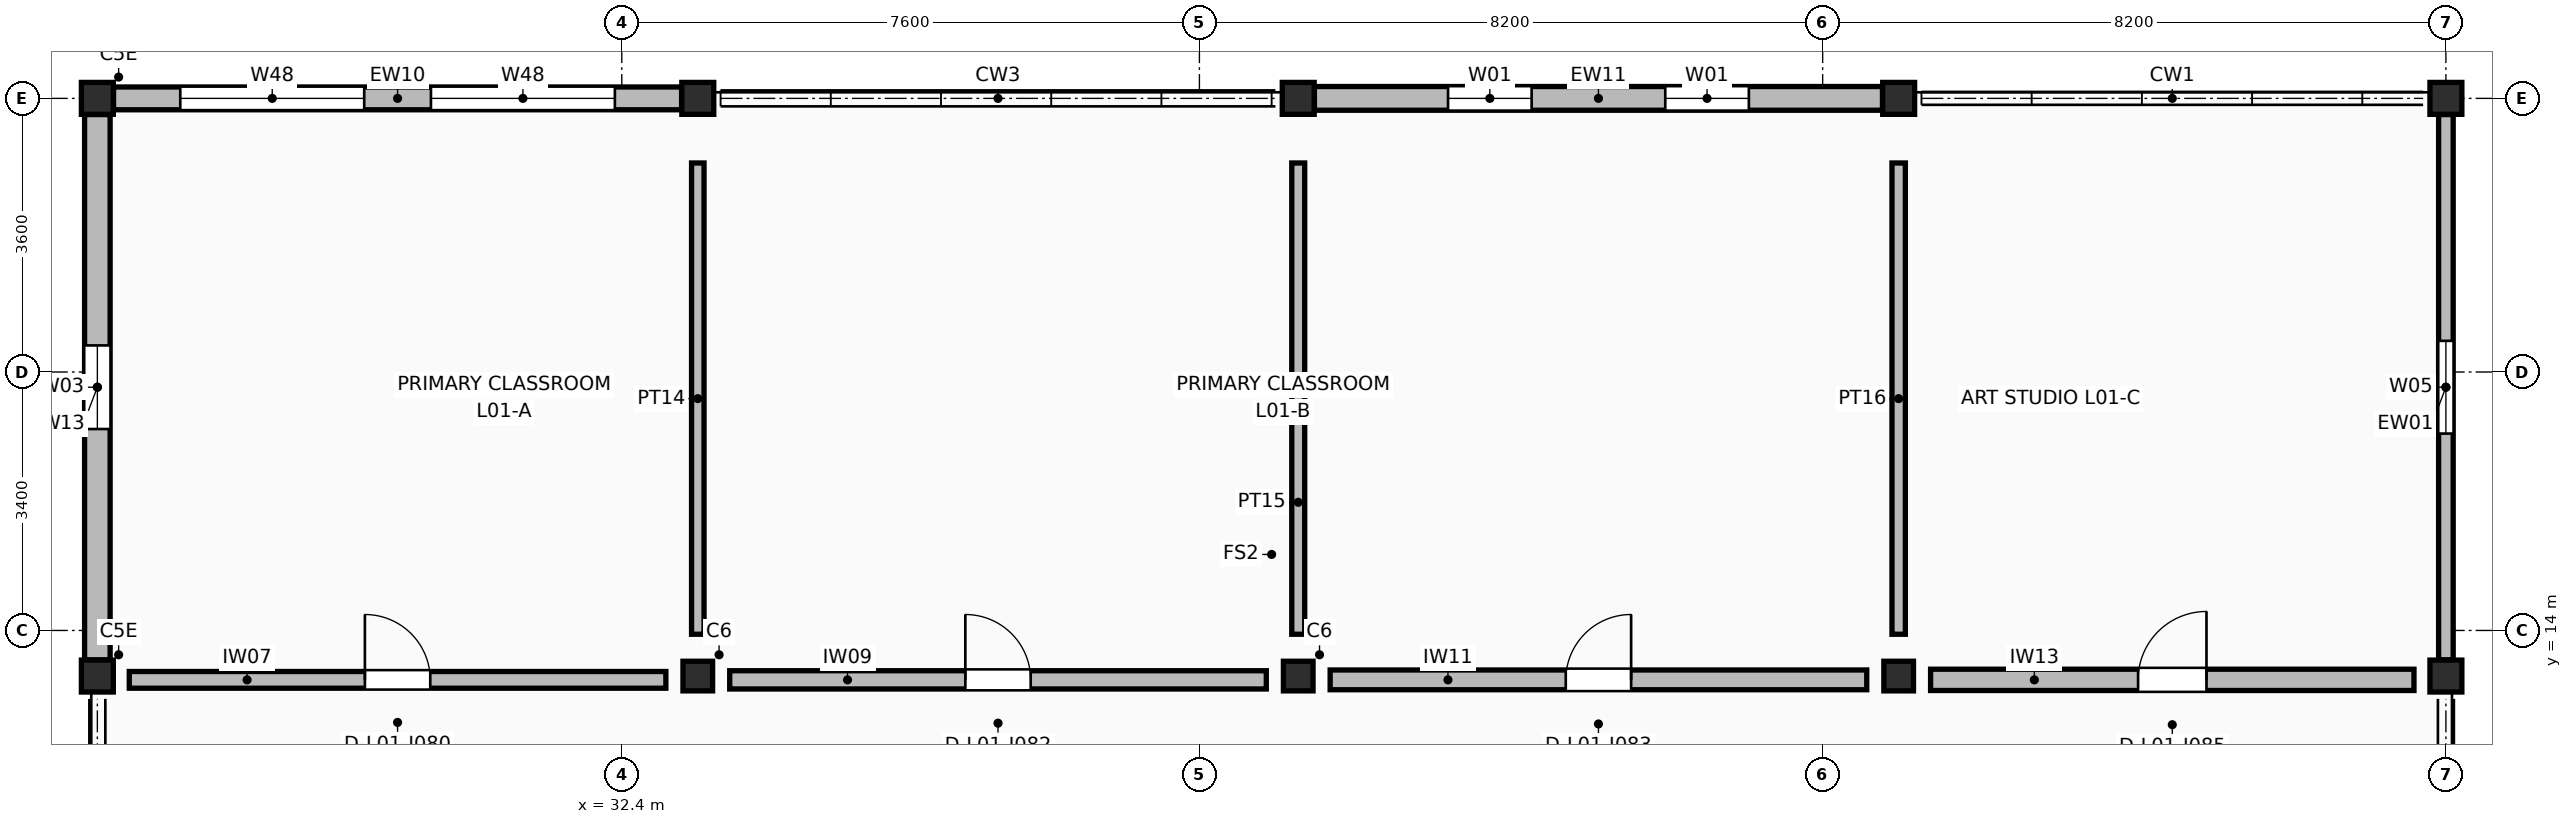
"""IFC4 building model, lengths in metres.
Left out: names, types, materials, properties, quantities, classifications, styles, units other than length and angle.
Written with IfcOpenShell. Run it as: python <this file> out.ifc"""

import sys

from ifc_helpers import new_model, si_unit, direction, frame, frame_2d, origin, origin_2d, place, context, subcontext, project, spatial, rectangle, extrude, element, fill, save


model = new_model("IFC4")
c1 = context("Model", 3, precision=1e-05, world=origin(), true_north=direction((0.0, 1.0)))
c2 = subcontext(c1, "Body", "Model", "MODEL_VIEW")
j1 = project(units=[si_unit("LENGTHUNIT", "METRE"), si_unit("PLANEANGLEUNIT", "RADIAN")], contexts=[c1])
p1 = place(None, origin())
s1 = spatial("IfcSite", under=j1, at=p1, CompositionType="ELEMENT")
p2 = place(p1, origin())
s2 = spatial("IfcBuilding", under=s1, at=p2, CompositionType="ELEMENT")
p3 = place(p2, frame((0.0, 0.0, 4.42)))
s3 = spatial("IfcBuildingStorey", under=s2, at=p3, CompositionType="ELEMENT", Elevation=4.42)
for number, where, z_axis, x_axis in (
    (1, (25.5, 13.4, 0.0), (0.0, 0.0, 1.0), (1.0, 0.0, 0.0)),
    (2, (25.5, 21.0, 0.0), (0.0, 0.0, 1.0), (1.0, 0.0, 0.0)),
):
    element("IfcColumn", number, at=place(p3, frame(where, z_axis=z_axis, x_axis=x_axis)), inside=s3, PredefinedType="COLUMN", context=c2, shape_type="SweptSolid", body=[
        extrude(rectangle(XDim=0.42, YDim=0.42, at=origin_2d()), origin(), (0.0, 0.0, 1.0), 3.74),
    ])
p4 = place(p3, frame((33.4, 13.4, 0.0), z_axis=(0.0, 0.0, 1.0), x_axis=(1.0, 0.0, 0.0)))
e3 = element("IfcColumn", 3, at=p4, inside=s3, PredefinedType="COLUMN", context=c2, shape_type="SweptSolid", body=[
    extrude(rectangle(XDim=0.39, YDim=0.39, at=origin_2d()), origin(), (0.0, 0.0, 1.0), 3.74),
])
p5 = place(p3, frame((33.4, 21.0, 0.0), z_axis=(0.0, 0.0, 1.0), x_axis=(1.0, 0.0, 0.0)))
e4 = element("IfcColumn", 4, at=p5, inside=s3, PredefinedType="COLUMN", context=c2, shape_type="SweptSolid", body=[
    extrude(rectangle(XDim=0.42, YDim=0.42, at=origin_2d()), origin(), (0.0, 0.0, 1.0), 3.74),
])
p6 = place(p3, frame((41.3, 13.4, 0.0), z_axis=(0.0, 0.0, 1.0), x_axis=(1.0, 0.0, 0.0)))
e5 = element("IfcColumn", 5, at=p6, inside=s3, PredefinedType="COLUMN", context=c2, shape_type="SweptSolid", body=[
    extrude(rectangle(XDim=0.39, YDim=0.39, at=origin_2d()), origin(), (0.0, 0.0, 1.0), 3.74),
])
p7 = place(p3, frame((41.3, 21.0, 0.0), z_axis=(0.0, 0.0, 1.0), x_axis=(1.0, 0.0, 0.0)))
e6 = element("IfcColumn", 6, at=p7, inside=s3, PredefinedType="COLUMN", context=c2, shape_type="SweptSolid", body=[
    extrude(rectangle(XDim=0.42, YDim=0.42, at=origin_2d()), origin(), (0.0, 0.0, 1.0), 3.74),
])
p8 = place(p3, frame((49.2, 13.4, 0.0), z_axis=(0.0, 0.0, 1.0), x_axis=(1.0, 0.0, 0.0)))
e7 = element("IfcColumn", 7, at=p8, inside=s3, PredefinedType="COLUMN", context=c2, shape_type="SweptSolid", body=[
    extrude(rectangle(XDim=0.39, YDim=0.39, at=origin_2d()), origin(), (0.0, 0.0, 1.0), 3.74),
])
for number, where, z_axis, x_axis in (
    (8, (49.2, 21.0, 0.0), (0.0, 0.0, 1.0), (1.0, 0.0, 0.0)),
    (9, (56.4, 13.4, 0.0), (0.0, 0.0, 1.0), (1.0, 0.0, 0.0)),
    (10, (56.4, 21.0, 0.0), (0.0, 0.0, 1.0), (1.0, 0.0, 0.0)),
):
    element("IfcColumn", number, at=place(p3, frame(where, z_axis=z_axis, x_axis=x_axis)), inside=s3, PredefinedType="COLUMN", context=c2, shape_type="SweptSolid", body=[
        extrude(rectangle(XDim=0.42, YDim=0.42, at=origin_2d()), origin(), (0.0, 0.0, 1.0), 3.74),
    ])
p9 = place(p3, frame((25.713, 21.0, 0.0), z_axis=(0.0, 0.0, 1.0), x_axis=(1.0, 0.0, 0.0)))
e11 = element("IfcWall", 11, at=p9, inside=s3, PredefinedType="STANDARD", context=c2, shape_type="SweptSolid", body=[
    extrude(rectangle(XDim=7.474, YDim=0.3, at=frame_2d((3.737, 0.0))), origin(), (0.0, 0.0, 1.0), 2.78),
])
p10 = place(p9, frame((0.878, 0.0, 0.95)))
e12 = element("IfcOpeningElement", 12, at=p10, cuts=e11, PredefinedType="OPENING", context=c2, shape_type="SweptSolid", body=[
    extrude(rectangle(XDim=2.42, YDim=1.6, at=frame_2d((1.21, 0.8))), frame((0.0, 0.16, 0.0), z_axis=(0.0, -1.0, 0.0), x_axis=(1.0, 0.0, 0.0)), (0.0, 0.0, 1.0), 0.32),
])
p11 = place(p9, frame((4.176, 0.0, 0.95)))
e13 = element("IfcOpeningElement", 13, at=p11, cuts=e11, PredefinedType="OPENING", context=c2, shape_type="SweptSolid", body=[
    extrude(rectangle(XDim=2.42, YDim=1.6, at=frame_2d((1.21, 0.8))), frame((0.0, 0.16, 0.0), z_axis=(0.0, -1.0, 0.0), x_axis=(1.0, 0.0, 0.0)), (0.0, 0.0, 1.0), 0.32),
])
p12 = place(p3, frame((41.513, 21.0, 0.0), z_axis=(0.0, 0.0, 1.0), x_axis=(1.0, 0.0, 0.0)))
e14 = element("IfcWall", 14, at=p12, inside=s3, PredefinedType="STANDARD", context=c2, shape_type="SweptSolid", body=[
    extrude(rectangle(XDim=7.474, YDim=0.312, at=frame_2d((3.737, 0.0))), origin(), (0.0, 0.0, 1.0), 2.78),
])
p13 = place(p12, frame((1.758, 0.0, 0.95)))
e15 = element("IfcOpeningElement", 15, at=p13, cuts=e14, PredefinedType="OPENING", context=c2, shape_type="SweptSolid", body=[
    extrude(rectangle(XDim=1.1, YDim=1.15, at=frame_2d((0.55, 0.575))), frame((0.0, 0.166, 0.0), z_axis=(0.0, -1.0, 0.0), x_axis=(1.0, 0.0, 0.0)), (0.0, 0.0, 1.0), 0.332),
])
p14 = place(p12, frame((4.616, 0.0, 0.95)))
e16 = element("IfcOpeningElement", 16, at=p14, cuts=e14, PredefinedType="OPENING", context=c2, shape_type="SweptSolid", body=[
    extrude(rectangle(XDim=1.1, YDim=1.15, at=frame_2d((0.55, 0.575))), frame((0.0, 0.166, 0.0), z_axis=(0.0, -1.0, 0.0), x_axis=(1.0, 0.0, 0.0)), (0.0, 0.0, 1.0), 0.332),
])
p15 = place(p3, frame((25.5, 13.613, 0.0), z_axis=(0.0, 0.0, 1.0), x_axis=(0.0, 1.0, 0.0)))
e17 = element("IfcWall", 17, at=p15, inside=s3, PredefinedType="STANDARD", context=c2, shape_type="SweptSolid", body=[
    extrude(rectangle(XDim=7.174, YDim=0.336, at=frame_2d((3.587, 0.0))), origin(), (0.0, 0.0, 1.0), 2.78),
])
p16 = place(p15, frame((3.037, 0.0, 0.95)))
e18 = element("IfcOpeningElement", 18, at=p16, cuts=e17, PredefinedType="OPENING", context=c2, shape_type="SweptSolid", body=[
    extrude(rectangle(XDim=1.1, YDim=1.45, at=frame_2d((0.55, 0.725))), frame((0.0, 0.178, 0.0), z_axis=(0.0, -1.0, 0.0), x_axis=(1.0, 0.0, 0.0)), (0.0, 0.0, 1.0), 0.356),
])
p17 = place(p3, frame((56.4, 13.613, 0.0), z_axis=(0.0, 0.0, 1.0), x_axis=(0.0, 1.0, 0.0)))
e19 = element("IfcWall", 19, at=p17, inside=s3, PredefinedType="STANDARD", context=c2, shape_type="SweptSolid", body=[
    extrude(rectangle(XDim=7.174, YDim=0.192, at=frame_2d((3.587, 0.0))), origin(), (0.0, 0.0, 1.0), 2.78),
])
p18 = place(p17, frame((2.977, 0.0, 0.95)))
e20 = element("IfcOpeningElement", 20, at=p18, cuts=e19, PredefinedType="OPENING", context=c2, shape_type="SweptSolid", body=[
    extrude(rectangle(XDim=1.22, YDim=1.15, at=frame_2d((0.61, 0.575))), frame((0.0, 0.106, 0.0), z_axis=(0.0, -1.0, 0.0), x_axis=(1.0, 0.0, 0.0)), (0.0, 0.0, 1.0), 0.212),
])
p19 = place(p3, frame((25.92, 13.35, 0.0), z_axis=(0.0, 0.0, 1.0), x_axis=(1.0, 0.0, 0.0)))
e21 = element("IfcWall", 21, at=p19, inside=s3, PredefinedType="STANDARD", context=c2, shape_type="SweptSolid", body=[
    extrude(rectangle(XDim=7.06, YDim=0.22, at=frame_2d((3.53, 0.0))), origin(), (0.0, 0.0, 1.0), 2.75),
])
p20 = place(p19, frame((3.1, 0.0, 0.0)))
e22 = element("IfcOpeningElement", 22, at=p20, cuts=e21, PredefinedType="OPENING", context=c2, shape_type="SweptSolid", body=[
    extrude(rectangle(XDim=0.86, YDim=2.06, at=frame_2d((0.43, 1.03))), frame((0.0, 0.12, 0.0), z_axis=(0.0, -1.0, 0.0), x_axis=(1.0, 0.0, 0.0)), (0.0, 0.0, 1.0), 0.24),
])
p21 = place(p3, frame((33.82, 13.35, 0.0), z_axis=(0.0, 0.0, 1.0), x_axis=(1.0, 0.0, 0.0)))
e23 = element("IfcWall", 23, at=p21, inside=s3, PredefinedType="STANDARD", context=c2, shape_type="SweptSolid", body=[
    extrude(rectangle(XDim=7.06, YDim=0.24, at=frame_2d((3.53, 0.0))), origin(), (0.0, 0.0, 1.0), 2.75),
])
p22 = place(p21, frame((3.1, 0.0, 0.0)))
e24 = element("IfcOpeningElement", 24, at=p22, cuts=e23, PredefinedType="OPENING", context=c2, shape_type="SweptSolid", body=[
    extrude(rectangle(XDim=0.86, YDim=2.18, at=frame_2d((0.43, 1.09))), frame((0.0, 0.13, 0.0), z_axis=(0.0, -1.0, 0.0), x_axis=(1.0, 0.0, 0.0)), (0.0, 0.0, 1.0), 0.26),
])
p23 = place(p3, frame((41.72, 13.35, 0.0), z_axis=(0.0, 0.0, 1.0), x_axis=(1.0, 0.0, 0.0)))
e25 = element("IfcWall", 25, at=p23, inside=s3, PredefinedType="STANDARD", context=c2, shape_type="SweptSolid", body=[
    extrude(rectangle(XDim=7.06, YDim=0.26, at=frame_2d((3.53, 0.0))), origin(), (0.0, 0.0, 1.0), 2.75),
])
p24 = place(p23, frame((3.1, 0.0, 0.0)))
e26 = element("IfcOpeningElement", 26, at=p24, cuts=e25, PredefinedType="OPENING", context=c2, shape_type="SweptSolid", body=[
    extrude(rectangle(XDim=0.86, YDim=2.24, at=frame_2d((0.43, 1.12))), frame((0.0, 0.14, 0.0), z_axis=(0.0, -1.0, 0.0), x_axis=(1.0, 0.0, 0.0)), (0.0, 0.0, 1.0), 0.28),
])
p25 = place(p3, frame((49.62, 13.35, 0.0), z_axis=(0.0, 0.0, 1.0), x_axis=(1.0, 0.0, 0.0)))
e27 = element("IfcWall", 27, at=p25, inside=s3, PredefinedType="STANDARD", context=c2, shape_type="SweptSolid", body=[
    extrude(rectangle(XDim=6.36, YDim=0.28, at=frame_2d((3.18, 0.0))), origin(), (0.0, 0.0, 1.0), 2.75),
])
p26 = place(p25, frame((2.73, 0.0, 0.0)))
e28 = element("IfcOpeningElement", 28, at=p26, cuts=e27, PredefinedType="OPENING", context=c2, shape_type="SweptSolid", body=[
    extrude(rectangle(XDim=0.9, YDim=2.12, at=frame_2d((0.45, 1.06))), frame((0.0, 0.15, 0.0), z_axis=(0.0, -1.0, 0.0), x_axis=(1.0, 0.0, 0.0)), (0.0, 0.0, 1.0), 0.3),
])
p27 = place(p3, frame((33.4, 13.95, 0.0), z_axis=(0.0, 0.0, 1.0), x_axis=(0.0, 1.0, 0.0)))
e29 = element("IfcWall", 29, at=p27, inside=s3, PredefinedType="PARTITIONING", context=c2, shape_type="SweptSolid", body=[
    extrude(rectangle(XDim=6.2, YDim=0.164, at=frame_2d((3.1, 0.0))), origin(), (0.0, 0.0, 1.0), 2.75),
])
p28 = place(p3, frame((41.3, 13.95, 0.0), z_axis=(0.0, 0.0, 1.0), x_axis=(0.0, 1.0, 0.0)))
e30 = element("IfcWall", 30, at=p28, inside=s3, PredefinedType="PARTITIONING", context=c2, shape_type="SweptSolid", body=[
    extrude(rectangle(XDim=6.2, YDim=0.17, at=frame_2d((3.1, 0.0))), origin(), (0.0, 0.0, 1.0), 2.75),
])
p29 = place(p3, frame((49.2, 13.95, 0.0), z_axis=(0.0, 0.0, 1.0), x_axis=(0.0, 1.0, 0.0)))
e31 = element("IfcWall", 31, at=p29, inside=s3, PredefinedType="PARTITIONING", context=c2, shape_type="SweptSolid", body=[
    extrude(rectangle(XDim=6.2, YDim=0.176, at=frame_2d((3.1, 0.0))), origin(), (0.0, 0.0, 1.0), 2.75),
])
p30 = place(p10, origin())
e32 = element("IfcWindow", 32, at=p30, inside=s3, PartitioningType="SINGLE_PANEL", PredefinedType="WINDOW", context=c2, shape_type="SweptSolid", body=[
    extrude(rectangle(XDim=2.42, YDim=1.6, at=frame_2d((1.21, 0.8))), frame((0.0, 0.03, 0.0), z_axis=(0.0, -1.0, 0.0), x_axis=(1.0, 0.0, 0.0)), (0.0, 0.0, 1.0), 0.06),
])
fill(e12, e32)
p31 = place(p11, origin())
e33 = element("IfcWindow", 33, at=p31, inside=s3, PartitioningType="SINGLE_PANEL", PredefinedType="WINDOW", context=c2, shape_type="SweptSolid", body=[
    extrude(rectangle(XDim=2.42, YDim=1.6, at=frame_2d((1.21, 0.8))), frame((0.0, 0.03, 0.0), z_axis=(0.0, -1.0, 0.0), x_axis=(1.0, 0.0, 0.0)), (0.0, 0.0, 1.0), 0.06),
])
fill(e13, e33)
p32 = place(p13, origin())
e34 = element("IfcWindow", 34, at=p32, inside=s3, PartitioningType="SINGLE_PANEL", PredefinedType="WINDOW", context=c2, shape_type="SweptSolid", body=[
    extrude(rectangle(XDim=1.1, YDim=1.15, at=frame_2d((0.55, 0.575))), frame((0.0, 0.03, 0.0), z_axis=(0.0, -1.0, 0.0), x_axis=(1.0, 0.0, 0.0)), (0.0, 0.0, 1.0), 0.06),
])
fill(e15, e34)
p33 = place(p14, origin())
e35 = element("IfcWindow", 35, at=p33, inside=s3, PartitioningType="SINGLE_PANEL", PredefinedType="WINDOW", context=c2, shape_type="SweptSolid", body=[
    extrude(rectangle(XDim=1.1, YDim=1.15, at=frame_2d((0.55, 0.575))), frame((0.0, 0.03, 0.0), z_axis=(0.0, -1.0, 0.0), x_axis=(1.0, 0.0, 0.0)), (0.0, 0.0, 1.0), 0.06),
])
fill(e16, e35)
p34 = place(p16, origin())
e36 = element("IfcWindow", 36, at=p34, inside=s3, PartitioningType="SINGLE_PANEL", PredefinedType="WINDOW", context=c2, shape_type="SweptSolid", body=[
    extrude(rectangle(XDim=1.1, YDim=1.45, at=frame_2d((0.55, 0.725))), frame((0.0, 0.03, 0.0), z_axis=(0.0, -1.0, 0.0), x_axis=(1.0, 0.0, 0.0)), (0.0, 0.0, 1.0), 0.06),
])
fill(e18, e36)
p35 = place(p18, origin())
e37 = element("IfcWindow", 37, at=p35, inside=s3, PartitioningType="SINGLE_PANEL", PredefinedType="WINDOW", context=c2, shape_type="SweptSolid", body=[
    extrude(rectangle(XDim=1.22, YDim=1.15, at=frame_2d((0.61, 0.575))), frame((0.0, 0.03, 0.0), z_axis=(0.0, -1.0, 0.0), x_axis=(1.0, 0.0, 0.0)), (0.0, 0.0, 1.0), 0.06),
])
fill(e20, e37)
p36 = place(p20, frame((0.86, 0.0, 0.0), z_axis=(0.0, 0.0, 1.0), x_axis=(-1.0, 0.0, 0.0)))
e38 = element("IfcDoor", 38, at=p36, inside=s3, OperationType="SINGLE_SWING_LEFT", PredefinedType="DOOR", context=c2, shape_type="SweptSolid", body=[
    extrude(rectangle(XDim=0.86, YDim=2.06, at=frame_2d((0.43, 1.03))), frame((0.0, 0.025, 0.0), z_axis=(0.0, -1.0, 0.0), x_axis=(1.0, 0.0, 0.0)), (0.0, 0.0, 1.0), 0.05),
])
fill(e22, e38)
p37 = place(p22, frame((0.86, 0.0, 0.0), z_axis=(0.0, 0.0, 1.0), x_axis=(-1.0, 0.0, 0.0)))
e39 = element("IfcDoor", 39, at=p37, inside=s3, OperationType="SINGLE_SWING_LEFT", PredefinedType="DOOR", context=c2, shape_type="SweptSolid", body=[
    extrude(rectangle(XDim=0.86, YDim=2.18, at=frame_2d((0.43, 1.09))), frame((0.0, 0.025, 0.0), z_axis=(0.0, -1.0, 0.0), x_axis=(1.0, 0.0, 0.0)), (0.0, 0.0, 1.0), 0.05),
])
fill(e24, e39)
p38 = place(p24, frame((0.86, 0.0, 0.0), z_axis=(0.0, 0.0, 1.0), x_axis=(-1.0, 0.0, 0.0)))
e40 = element("IfcDoor", 40, at=p38, inside=s3, OperationType="SINGLE_SWING_RIGHT", PredefinedType="DOOR", context=c2, shape_type="SweptSolid", body=[
    extrude(rectangle(XDim=0.86, YDim=2.24, at=frame_2d((0.43, 1.12))), frame((0.0, 0.025, 0.0), z_axis=(0.0, -1.0, 0.0), x_axis=(1.0, 0.0, 0.0)), (0.0, 0.0, 1.0), 0.05),
])
fill(e26, e40)
p39 = place(p26, frame((0.9, 0.0, 0.0), z_axis=(0.0, 0.0, 1.0), x_axis=(-1.0, 0.0, 0.0)))
e41 = element("IfcDoor", 41, at=p39, inside=s3, OperationType="SINGLE_SWING_RIGHT", PredefinedType="DOOR", context=c2, shape_type="SweptSolid", body=[
    extrude(rectangle(XDim=0.9, YDim=2.12, at=frame_2d((0.45, 1.06))), frame((0.0, 0.025, 0.0), z_axis=(0.0, -1.0, 0.0), x_axis=(1.0, 0.0, 0.0)), (0.0, 0.0, 1.0), 0.05),
])
fill(e28, e41)
save(model, sys.argv[1])
